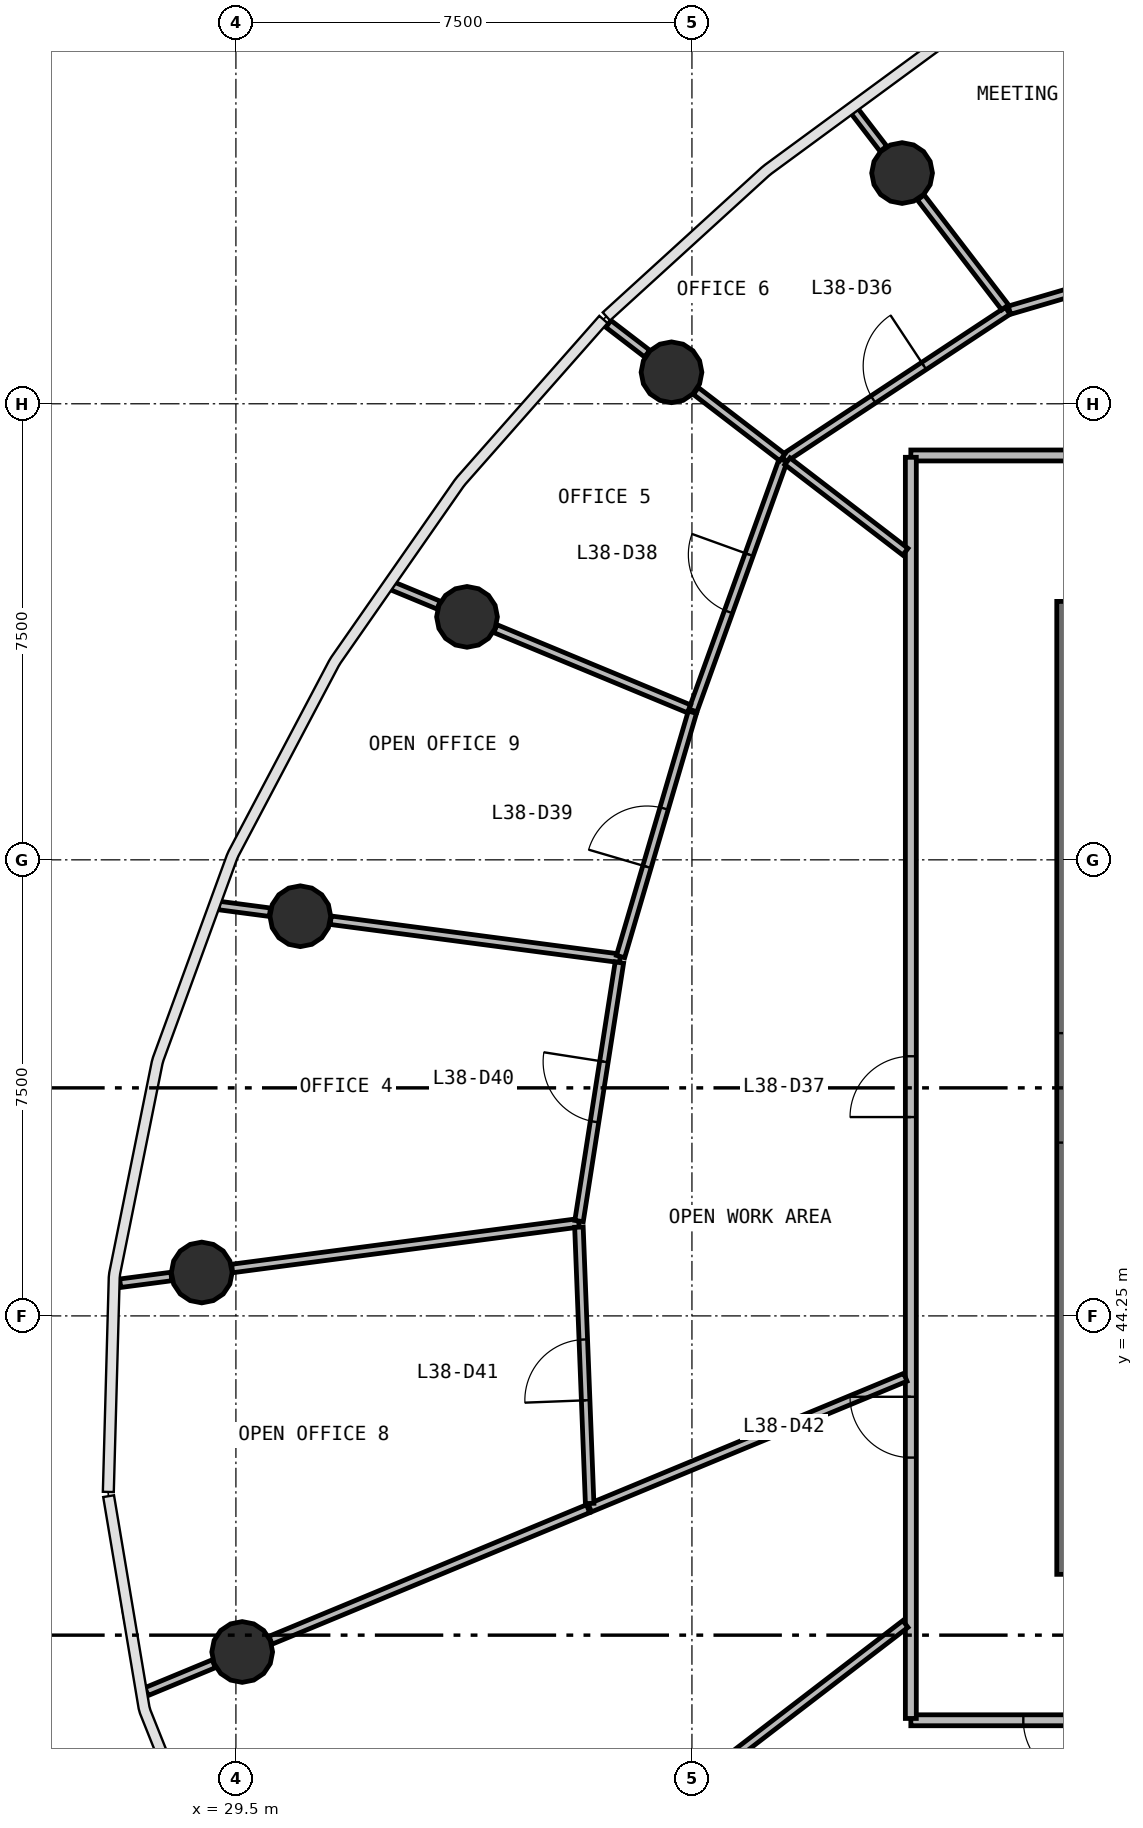
"""IFC4 building model, lengths in metres.
Left out: names, types, materials, properties, quantities, classifications, styles, units other than length and angle.
Written with IfcOpenShell. Run it as: python <this file> out.ifc"""

import sys

from ifc_helpers import new_model, si_unit, direction, frame, frame_2d, origin, origin_2d, place, context, subcontext, project, spatial, rectangle, circle, extrude, source, transform, mapped, element, fill, save


model = new_model("IFC4")
c1 = context("Model", 3, precision=1e-05, world=origin(), true_north=direction((0.0, 1.0)))
c2 = subcontext(c1, "Body", "Model", "MODEL_VIEW")
j1 = project(units=[si_unit("LENGTHUNIT", "METRE"), si_unit("PLANEANGLEUNIT", "RADIAN")], contexts=[c1])
p1 = place(None, origin())
s1 = spatial("IfcSite", under=j1, at=p1, CompositionType="ELEMENT")
p2 = place(p1, origin())
s2 = spatial("IfcBuilding", under=s1, at=p2, CompositionType="ELEMENT")
p3 = place(p2, frame((0.0, 0.0, 160.4)))
s3 = spatial("IfcBuildingStorey", under=s2, at=p3, CompositionType="ELEMENT", Elevation=160.4)
p4 = place(p3, frame((43.4, 56.0, 0.0), z_axis=(0.0, 0.0, 1.0), x_axis=(0.0, -1.0, 0.0)))
e1 = element("IfcWall", 1, at=p4, inside=s3, PredefinedType="SHEAR", context=c2, shape_type="SweptSolid", body=[
    extrude(rectangle(XDim=16.0, YDim=0.8, at=frame_2d((8.0, 0.0))), origin(), (0.0, 0.0, 1.0), 3.9),
])
p5 = place(p4, frame((7.1, 0.0, 0.0)))
e2 = element("IfcOpeningElement", 2, at=p5, cuts=e1, PredefinedType="OPENING", context=c2, shape_type="SweptSolid", body=[
    extrude(rectangle(XDim=1.8, YDim=2.1, at=frame_2d((0.9, 1.05))), frame((0.0, 0.41, 0.0), z_axis=(0.0, -1.0, 0.0), x_axis=(1.0, 0.0, 0.0)), (0.0, 0.0, 1.0), 0.82),
])
m1 = source(origin(), c2, "Body", "SweptSolid", [
    extrude(circle(Radius=0.5, at=origin_2d()), origin(), (0.0, 0.0, 1.0), 3.9),
])
for number, where, z_axis, x_axis in (
    (3, (40.456, 63.044, 0.0), (0.0, 0.0, 1.0), (1.0, 0.0, 0.0)),
    (4, (36.664, 59.768, 0.0), (0.0, 0.0, 1.0), (1.0, 0.0, 0.0)),
    (5, (33.301, 55.746, 0.0), (0.0, 0.0, 1.0), (1.0, 0.0, 0.0)),
    (6, (30.559, 50.823, 0.0), (0.0, 0.0, 1.0), (1.0, 0.0, 0.0)),
    (7, (28.938, 44.964, 0.0), (0.0, 0.0, 1.0), (1.0, 0.0, 0.0)),
    (8, (29.603, 38.723, 0.0), (0.0, 0.0, 1.0), (1.0, 0.0, 0.0)),
):
    element("IfcColumn", number, at=place(p3, frame(where, z_axis=z_axis, x_axis=x_axis)), inside=s3, PredefinedType="COLUMN", context=c2, shape_type="MappedRepresentation", body=[
        mapped(m1, transform((0.0, 0.0, 0.0), scale=1.0)),
    ])
p6 = place(p3, frame((40.6, 58.4, 0.0), z_axis=(0.0, 0.0, 1.0), x_axis=(1.0, 0.0, 0.0)))
e9 = element("IfcWall", 9, at=p6, inside=s3, PredefinedType="PARTITIONING", context=c2, shape_type="SweptSolid", body=[
    extrude(rectangle(XDim=22.8, YDim=0.18, at=frame_2d((11.4, 0.0))), origin(), (0.0, 0.0, 1.0), 2.88),
])
p7 = place(p6, frame((12.95, 0.0, 0.0)))
e10 = element("IfcOpeningElement", 10, at=p7, cuts=e9, PredefinedType="OPENING", context=c2, shape_type="SweptSolid", body=[
    extrude(rectangle(XDim=1.0, YDim=2.1, at=frame_2d((0.5, 1.05))), frame((0.0, 0.1, 0.0), z_axis=(0.0, -1.0, 0.0), x_axis=(1.0, 0.0, 0.0)), (0.0, 0.0, 1.0), 0.2),
])
p8 = place(p6, frame((10.95, 0.0, 0.0)))
e11 = element("IfcOpeningElement", 11, at=p8, cuts=e9, PredefinedType="OPENING", context=c2, shape_type="SweptSolid", body=[
    extrude(rectangle(XDim=1.0, YDim=2.1, at=frame_2d((0.5, 1.05))), frame((0.0, 0.1, 0.0), z_axis=(0.0, -1.0, 0.0), x_axis=(1.0, 0.0, 0.0)), (0.0, 0.0, 1.0), 0.2),
])
p9 = place(p3, frame((63.4, 37.6, 0.0), z_axis=(0.0, 0.0, 1.0), x_axis=(-1.0, 0.0, 0.0)))
e12 = element("IfcWall", 12, at=p9, inside=s3, PredefinedType="PARTITIONING", context=c2, shape_type="SweptSolid", body=[
    extrude(rectangle(XDim=22.8, YDim=0.18, at=frame_2d((11.4, 0.0))), origin(), (0.0, 0.0, 1.0), 2.88),
])
p10 = place(p9, frame((16.05, 0.0, 0.0)))
e13 = element("IfcOpeningElement", 13, at=p10, cuts=e12, PredefinedType="OPENING", context=c2, shape_type="SweptSolid", body=[
    extrude(rectangle(XDim=0.9, YDim=2.1, at=frame_2d((0.45, 1.05))), frame((0.0, 0.1, 0.0), z_axis=(0.0, -1.0, 0.0), x_axis=(1.0, 0.0, 0.0)), (0.0, 0.0, 1.0), 0.2),
])
p11 = place(p9, frame((13.05, 0.0, 0.0)))
e14 = element("IfcOpeningElement", 14, at=p11, cuts=e12, PredefinedType="OPENING", context=c2, shape_type="SweptSolid", body=[
    extrude(rectangle(XDim=0.9, YDim=2.1, at=frame_2d((0.45, 1.05))), frame((0.0, 0.1, 0.0), z_axis=(0.0, -1.0, 0.0), x_axis=(1.0, 0.0, 0.0)), (0.0, 0.0, 1.0), 0.2),
])
p12 = place(p9, frame((10.95, 0.0, 0.0)))
e15 = element("IfcOpeningElement", 15, at=p12, cuts=e12, PredefinedType="OPENING", context=c2, shape_type="SweptSolid", body=[
    extrude(rectangle(XDim=1.0, YDim=2.1, at=frame_2d((0.5, 1.05))), frame((0.0, 0.1, 0.0), z_axis=(0.0, -1.0, 0.0), x_axis=(1.0, 0.0, 0.0)), (0.0, 0.0, 1.0), 0.2),
])
p13 = place(p9, frame((19.95, 0.0, 0.0)))
e16 = element("IfcOpeningElement", 16, at=p13, cuts=e12, PredefinedType="OPENING", context=c2, shape_type="SweptSolid", body=[
    extrude(rectangle(XDim=1.0, YDim=2.1, at=frame_2d((0.5, 1.05))), frame((0.0, 0.1, 0.0), z_axis=(0.0, -1.0, 0.0), x_axis=(1.0, 0.0, 0.0)), (0.0, 0.0, 1.0), 0.2),
])
p14 = place(p3, frame((40.6, 37.63, 0.0), z_axis=(0.0, 0.0, 1.0), x_axis=(0.0, 1.0, 0.0)))
e17 = element("IfcWall", 17, at=p14, inside=s3, PredefinedType="PARTITIONING", context=c2, shape_type="SweptSolid", body=[
    extrude(rectangle(XDim=20.74, YDim=0.18, at=frame_2d((10.37, 0.0))), origin(), (0.0, 0.0, 1.0), 2.88),
])
p15 = place(p14, frame((9.89, 0.0, 0.0)))
e18 = element("IfcOpeningElement", 18, at=p15, cuts=e17, PredefinedType="OPENING", context=c2, shape_type="SweptSolid", body=[
    extrude(rectangle(XDim=1.0, YDim=2.1, at=frame_2d((0.5, 1.05))), frame((0.0, 0.1, 0.0), z_axis=(0.0, -1.0, 0.0), x_axis=(1.0, 0.0, 0.0)), (0.0, 0.0, 1.0), 0.2),
])
p16 = place(p14, frame((4.29, 0.0, 0.0)))
e19 = element("IfcOpeningElement", 19, at=p16, cuts=e17, PredefinedType="OPENING", context=c2, shape_type="SweptSolid", body=[
    extrude(rectangle(XDim=1.0, YDim=2.1, at=frame_2d((0.5, 1.05))), frame((0.0, 0.1, 0.0), z_axis=(0.0, -1.0, 0.0), x_axis=(1.0, 0.0, 0.0)), (0.0, 0.0, 1.0), 0.2),
])
p17 = place(p3, frame((35.139, 45.78, 0.0), z_axis=(0.0, 0.0, 1.0), x_axis=(-0.99144533292, -0.130522610424, 0.0)))
e20 = element("IfcWall", 20, at=p17, inside=s3, PredefinedType="PARTITIONING", context=c2, shape_type="SweptSolid", body=[
    extrude(rectangle(XDim=5.75, YDim=0.14, at=frame_2d((2.875, 0.0))), origin(), (0.0, 0.0, 1.0), 2.88),
])
p18 = place(p3, frame((40.51, 43.241, 0.0), z_axis=(0.0, 0.0, 1.0), x_axis=(-0.92387220975, -0.382701110597, 0.0)))
e21 = element("IfcWall", 21, at=p18, inside=s3, PredefinedType="PARTITIONING", context=c2, shape_type="SweptSolid", body=[
    extrude(rectangle(XDim=5.617, YDim=0.14, at=frame_2d((2.809, 0.0))), origin(), (0.0, 0.0, 1.0), 2.88),
])
p19 = place(p3, frame((35.293, 41.08, 0.0), z_axis=(0.0, 0.0, 1.0), x_axis=(-0.923883666289, -0.38267345239, 0.0)))
e22 = element("IfcWall", 22, at=p19, inside=s3, PredefinedType="PARTITIONING", context=c2, shape_type="SweptSolid", body=[
    extrude(rectangle(XDim=5.653, YDim=0.14, at=frame_2d((2.827, 0.0))), origin(), (0.0, 0.0, 1.0), 2.88),
])
p20 = place(p3, frame((40.51, 39.183, 0.0), z_axis=(0.0, 0.0, 1.0), x_axis=(-0.793354275357, -0.608760210405, 0.0)))
e23 = element("IfcWall", 23, at=p20, inside=s3, PredefinedType="PARTITIONING", context=c2, shape_type="SweptSolid", body=[
    extrude(rectangle(XDim=4.88, YDim=0.14, at=frame_2d((2.44, 0.0))), origin(), (0.0, 0.0, 1.0), 2.88),
])
p21 = place(p3, frame((35.817, 50.131, 0.0), z_axis=(0.0, 0.0, 1.0), x_axis=(-0.991450832312, 0.13048083042, 0.0)))
e24 = element("IfcWall", 24, at=p21, inside=s3, PredefinedType="PARTITIONING", context=c2, shape_type="SweptSolid", body=[
    extrude(rectangle(XDim=4.799, YDim=0.14, at=frame_2d((2.4, 0.0))), origin(), (0.0, 0.0, 1.0), 2.88),
])
p22 = place(p3, frame((35.318, 41.166, 0.0), z_axis=(0.0, 0.0, 1.0), x_axis=(-0.038760942668, 0.999248512295, 0.0)))
e25 = element("IfcWall", 25, at=p22, inside=s3, PredefinedType="PARTITIONING", context=c2, shape_type="SweptSolid", body=[
    extrude(rectangle(XDim=4.548, YDim=0.14, at=frame_2d((2.274, 0.0))), origin(), (0.0, 0.0, 1.0), 2.88),
])
p23 = place(p22, frame((1.698, 0.0, 0.0)))
e26 = element("IfcOpeningElement", 26, at=p23, cuts=e25, PredefinedType="OPENING", context=c2, shape_type="SweptSolid", body=[
    extrude(rectangle(XDim=1.0, YDim=2.1, at=frame_2d((0.5, 1.05))), frame((0.0, 0.08, 0.0), z_axis=(0.0, -1.0, 0.0), x_axis=(1.0, 0.0, 0.0)), (0.0, 0.0, 1.0), 0.16),
])
p24 = place(p3, frame((38.511, 58.351, 0.0), z_axis=(0.0, 0.0, 1.0), x_axis=(0.834612459485, 0.550837582662, 0.0)))
e27 = element("IfcWall", 27, at=p24, inside=s3, PredefinedType="PARTITIONING", context=c2, shape_type="SweptSolid", body=[
    extrude(rectangle(XDim=4.412, YDim=0.14, at=frame_2d((2.206, 0.0))), origin(), (0.0, 0.0, 1.0), 2.88),
])
p25 = place(p24, frame((1.762, 0.0, 0.0)))
e28 = element("IfcOpeningElement", 28, at=p25, cuts=e27, PredefinedType="OPENING", context=c2, shape_type="SweptSolid", body=[
    extrude(rectangle(XDim=1.0, YDim=2.1, at=frame_2d((0.5, 1.05))), frame((0.0, 0.08, 0.0), z_axis=(0.0, -1.0, 0.0), x_axis=(1.0, 0.0, 0.0)), (0.0, 0.0, 1.0), 0.16),
])
p26 = place(p3, frame((37.016, 54.207, 0.0), z_axis=(0.0, 0.0, 1.0), x_axis=(0.339349662801, 0.940660303381, 0.0)))
e29 = element("IfcWall", 29, at=p26, inside=s3, PredefinedType="PARTITIONING", context=c2, shape_type="SweptSolid", body=[
    extrude(rectangle(XDim=4.376, YDim=0.14, at=frame_2d((2.188, 0.0))), origin(), (0.0, 0.0, 1.0), 2.88),
])
p27 = place(p26, frame((1.725, 0.0, 0.0)))
e30 = element("IfcOpeningElement", 30, at=p27, cuts=e29, PredefinedType="OPENING", context=c2, shape_type="SweptSolid", body=[
    extrude(rectangle(XDim=1.0, YDim=2.1, at=frame_2d((0.5, 1.05))), frame((0.0, 0.08, 0.0), z_axis=(0.0, -1.0, 0.0), x_axis=(1.0, 0.0, 0.0)), (0.0, 0.0, 1.0), 0.16),
])
p28 = place(p3, frame((35.143, 45.81, 0.0), z_axis=(0.0, 0.0, 1.0), x_axis=(0.154158792567, 0.988046085299, 0.0)))
e31 = element("IfcWall", 31, at=p28, inside=s3, PredefinedType="PARTITIONING", context=c2, shape_type="SweptSolid", body=[
    extrude(rectangle(XDim=4.303, YDim=0.14, at=frame_2d((2.151, 0.0))), origin(), (0.0, 0.0, 1.0), 2.88),
])
p29 = place(p28, frame((1.653, 0.0, 0.0)))
e32 = element("IfcOpeningElement", 32, at=p29, cuts=e31, PredefinedType="OPENING", context=c2, shape_type="SweptSolid", body=[
    extrude(rectangle(XDim=1.0, YDim=2.1, at=frame_2d((0.5, 1.05))), frame((0.0, 0.08, 0.0), z_axis=(0.0, -1.0, 0.0), x_axis=(1.0, 0.0, 0.0)), (0.0, 0.0, 1.0), 0.16),
])
p30 = place(p3, frame((35.826, 50.159, 0.0), z_axis=(0.0, 0.0, 1.0), x_axis=(0.28208743745, 0.959388699971, 0.0)))
e33 = element("IfcWall", 33, at=p30, inside=s3, PredefinedType="PARTITIONING", context=c2, shape_type="SweptSolid", body=[
    extrude(rectangle(XDim=4.189, YDim=0.14, at=frame_2d((2.094, 0.0))), origin(), (0.0, 0.0, 1.0), 2.88),
])
p31 = place(p30, frame((1.539, 0.0, 0.0)))
e34 = element("IfcOpeningElement", 34, at=p31, cuts=e33, PredefinedType="OPENING", context=c2, shape_type="SweptSolid", body=[
    extrude(rectangle(XDim=1.0, YDim=2.1, at=frame_2d((0.5, 1.05))), frame((0.0, 0.08, 0.0), z_axis=(0.0, -1.0, 0.0), x_axis=(1.0, 0.0, 0.0)), (0.0, 0.0, 1.0), 0.16),
])
p32 = place(p3, frame((42.222, 60.789, 0.0), z_axis=(0.0, 0.0, 1.0), x_axis=(0.959559478974, 0.281505961415, 0.0)))
e35 = element("IfcWall", 35, at=p32, inside=s3, PredefinedType="PARTITIONING", context=c2, shape_type="SweptSolid", body=[
    extrude(rectangle(XDim=4.164, YDim=0.14, at=frame_2d((2.082, 0.0))), origin(), (0.0, 0.0, 1.0), 2.88),
])
p33 = place(p32, frame((1.514, 0.0, 0.0)))
e36 = element("IfcOpeningElement", 36, at=p33, cuts=e35, PredefinedType="OPENING", context=c2, shape_type="SweptSolid", body=[
    extrude(rectangle(XDim=1.0, YDim=2.1, at=frame_2d((0.5, 1.05))), frame((0.0, 0.08, 0.0), z_axis=(0.0, -1.0, 0.0), x_axis=(1.0, 0.0, 0.0)), (0.0, 0.0, 1.0), 0.16),
])
p34 = place(p3, frame((36.951, 54.233, 0.0), z_axis=(0.0, 0.0, 1.0), x_axis=(-0.923873497733, 0.382698001285, 0.0)))
e37 = element("IfcWall", 37, at=p34, inside=s3, PredefinedType="PARTITIONING", context=c2, shape_type="SweptSolid", body=[
    extrude(rectangle(XDim=3.446, YDim=0.14, at=frame_2d((1.723, 0.0))), origin(), (0.0, 0.0, 1.0), 2.88),
])
p35 = place(p3, frame((43.951, 37.51, 0.0), z_axis=(0.0, 0.0, 1.0), x_axis=(-0.608758797461, -0.793355359542, 0.0)))
e38 = element("IfcWall", 38, at=p35, inside=s3, PredefinedType="PARTITIONING", context=c2, shape_type="SweptSolid", body=[
    extrude(rectangle(XDim=3.038, YDim=0.14, at=frame_2d((1.519, 0.0))), origin(), (0.0, 0.0, 1.0), 2.88),
])
p36 = place(p3, frame((40.51, 56.817, 0.0), z_axis=(0.0, 0.0, 1.0), x_axis=(-0.793387804713, 0.608716511467, 0.0)))
e39 = element("IfcWall", 39, at=p36, inside=s3, PredefinedType="PARTITIONING", context=c2, shape_type="SweptSolid", body=[
    extrude(rectangle(XDim=2.446, YDim=0.14, at=frame_2d((1.223, 0.0))), origin(), (0.0, 0.0, 1.0), 2.88),
])
p37 = place(p3, frame((42.15, 60.836, 0.0), z_axis=(0.0, 0.0, 1.0), x_axis=(-0.608757629388, 0.793356255828, 0.0)))
e40 = element("IfcWall", 40, at=p37, inside=s3, PredefinedType="PARTITIONING", context=c2, shape_type="SweptSolid", body=[
    extrude(rectangle(XDim=2.279, YDim=0.14, at=frame_2d((1.139, 0.0))), origin(), (0.0, 0.0, 1.0), 2.88),
])
p38 = place(p3, frame((38.487, 58.369, 0.0), z_axis=(0.0, 0.0, 1.0), x_axis=(-0.793336842099, 0.608782929269, 0.0)))
e41 = element("IfcWall", 41, at=p38, inside=s3, PredefinedType="PARTITIONING", context=c2, shape_type="SweptSolid", body=[
    extrude(rectangle(XDim=1.794, YDim=0.14, at=frame_2d((0.897, 0.0))), origin(), (0.0, 0.0, 1.0), 2.88),
])
p39 = place(p3, frame((29.137, 38.53, 0.0), z_axis=(0.0, 0.0, 1.0), x_axis=(-0.923882723383, -0.382675728829, 0.0)))
e42 = element("IfcWall", 42, at=p39, inside=s3, PredefinedType="PARTITIONING", context=c2, shape_type="SweptSolid", body=[
    extrude(rectangle(XDim=1.198, YDim=0.14, at=frame_2d((0.599, 0.0))), origin(), (0.0, 0.0, 1.0), 2.88),
])
p40 = place(p3, frame((30.059, 50.889, 0.0), z_axis=(0.0, 0.0, 1.0), x_axis=(-0.991446500326, 0.130513742537, 0.0)))
e43 = element("IfcWall", 43, at=p40, inside=s3, PredefinedType="PARTITIONING", context=c2, shape_type="SweptSolid", body=[
    extrude(rectangle(XDim=0.853, YDim=0.14, at=frame_2d((0.427, 0.0))), origin(), (0.0, 0.0, 1.0), 2.88),
])
p41 = place(p3, frame((28.438, 44.898, 0.0), z_axis=(0.0, 0.0, 1.0), x_axis=(-0.991432738393, -0.130618242377, 0.0)))
e44 = element("IfcWall", 44, at=p41, inside=s3, PredefinedType="PARTITIONING", context=c2, shape_type="SweptSolid", body=[
    extrude(rectangle(XDim=0.849, YDim=0.14, at=frame_2d((0.424, 0.0))), origin(), (0.0, 0.0, 1.0), 2.88),
])
p42 = place(p3, frame((32.834, 55.939, 0.0), z_axis=(0.0, 0.0, 1.0), x_axis=(-0.923909393783, 0.382611332921, 0.0)))
e45 = element("IfcWall", 45, at=p42, inside=s3, PredefinedType="PARTITIONING", context=c2, shape_type="SweptSolid", body=[
    extrude(rectangle(XDim=0.831, YDim=0.14, at=frame_2d((0.416, 0.0))), origin(), (0.0, 0.0, 1.0), 2.88),
])
p43 = place(p3, frame((36.263, 60.075, 0.0), z_axis=(0.0, 0.0, 1.0), x_axis=(-0.793425360376, 0.608667559109, 0.0)))
e46 = element("IfcWall", 46, at=p43, inside=s3, PredefinedType="PARTITIONING", context=c2, shape_type="SweptSolid", body=[
    extrude(rectangle(XDim=0.803, YDim=0.14, at=frame_2d((0.402, 0.0))), origin(), (0.0, 0.0, 1.0), 2.88),
])
p44 = place(p3, frame((40.149, 63.445, 0.0), z_axis=(0.0, 0.0, 1.0), x_axis=(-0.608659697441, 0.793431391307, 0.0)))
e47 = element("IfcWall", 47, at=p44, inside=s3, PredefinedType="PARTITIONING", context=c2, shape_type="SweptSolid", body=[
    extrude(rectangle(XDim=0.786, YDim=0.14, at=frame_2d((0.393, 0.0))), origin(), (0.0, 0.0, 1.0), 2.88),
])
m2 = source(origin(), c2, "Body", "SweptSolid", [
    extrude(rectangle(XDim=1.0, YDim=2.1, at=frame_2d((0.5, 1.05))), frame((0.0, 0.025, 0.0), z_axis=(0.0, -1.0, 0.0), x_axis=(1.0, 0.0, 0.0)), (0.0, 0.0, 1.0), 0.05),
])
p45 = place(p25, origin())
e48 = element("IfcDoor", 48, at=p45, inside=s3, OperationType="SINGLE_SWING_RIGHT", PredefinedType="DOOR", context=c2, shape_type="MappedRepresentation", body=[
    mapped(m2, transform((0.0, 0.0, 0.0), scale=1.0)),
])
fill(e28, e48)
p46 = place(p15, origin())
e49 = element("IfcDoor", 49, at=p46, inside=s3, OperationType="SINGLE_SWING_LEFT", PredefinedType="DOOR", context=c2, shape_type="MappedRepresentation", body=[
    mapped(m2, transform((0.0, 0.0, 0.0), scale=1.0)),
])
fill(e18, e49)
p47 = place(p27, origin())
e50 = element("IfcDoor", 50, at=p47, inside=s3, OperationType="SINGLE_SWING_RIGHT", PredefinedType="DOOR", context=c2, shape_type="MappedRepresentation", body=[
    mapped(m2, transform((0.0, 0.0, 0.0), scale=1.0)),
])
fill(e30, e50)
p48 = place(p31, origin())
e51 = element("IfcDoor", 51, at=p48, inside=s3, OperationType="SINGLE_SWING_LEFT", PredefinedType="DOOR", context=c2, shape_type="MappedRepresentation", body=[
    mapped(m2, transform((0.0, 0.0, 0.0), scale=1.0)),
])
fill(e34, e51)
p49 = place(p29, origin())
e52 = element("IfcDoor", 52, at=p49, inside=s3, OperationType="SINGLE_SWING_RIGHT", PredefinedType="DOOR", context=c2, shape_type="MappedRepresentation", body=[
    mapped(m2, transform((0.0, 0.0, 0.0), scale=1.0)),
])
fill(e32, e52)
p50 = place(p23, origin())
e53 = element("IfcDoor", 53, at=p50, inside=s3, OperationType="SINGLE_SWING_LEFT", PredefinedType="DOOR", context=c2, shape_type="MappedRepresentation", body=[
    mapped(m2, transform((0.0, 0.0, 0.0), scale=1.0)),
])
fill(e26, e53)
p51 = place(p16, origin())
e54 = element("IfcDoor", 54, at=p51, inside=s3, OperationType="SINGLE_SWING_RIGHT", PredefinedType="DOOR", context=c2, shape_type="MappedRepresentation", body=[
    mapped(m2, transform((0.0, 0.0, 0.0), scale=1.0)),
])
fill(e19, e54)
p52 = place(p13, origin())
e55 = element("IfcDoor", 55, at=p52, inside=s3, OperationType="SINGLE_SWING_LEFT", PredefinedType="DOOR", context=c2, shape_type="MappedRepresentation", body=[
    mapped(m2, transform((0.0, 0.0, 0.0), scale=1.0)),
])
fill(e16, e55)
save(model, sys.argv[1])
